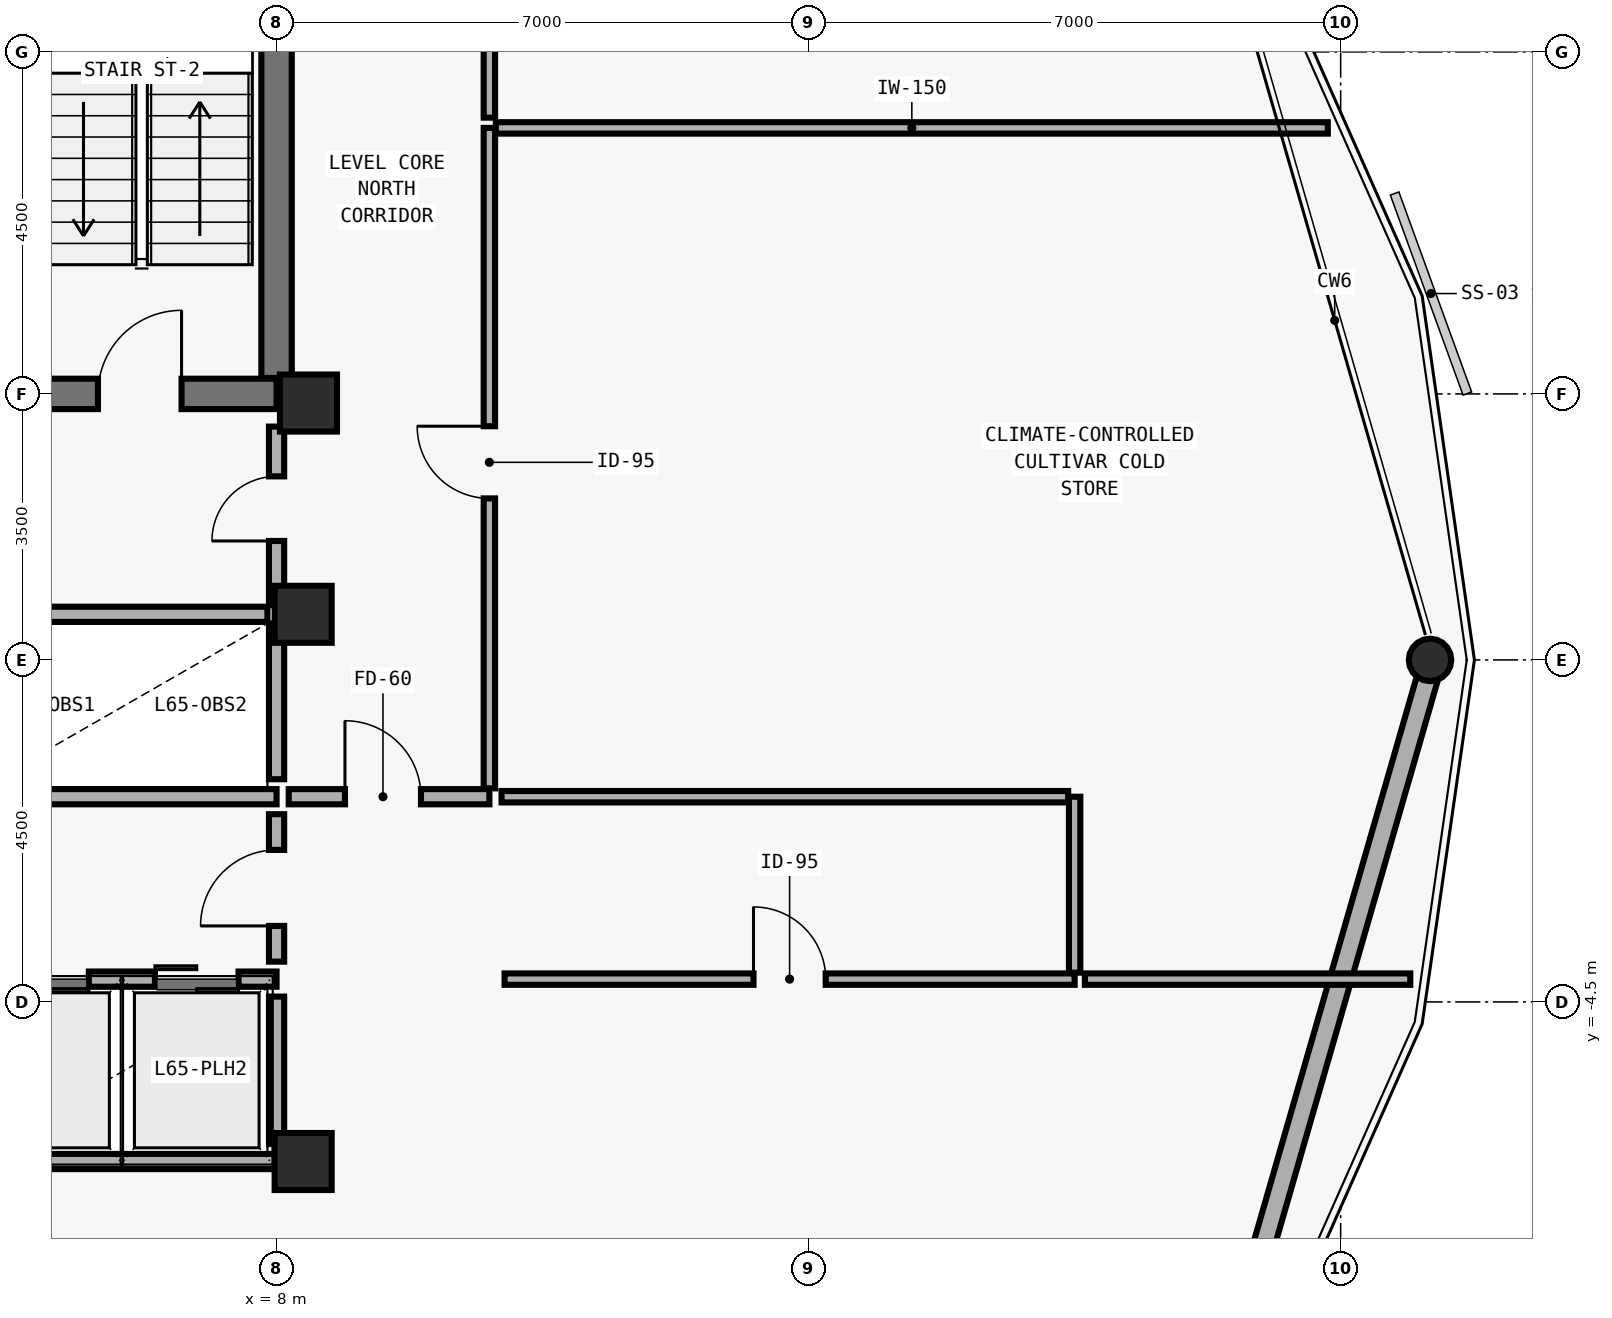
"""IFC4 building model, lengths in metres.
Left out: names, types, materials, properties, quantities, classifications, styles, units other than length and angle.
Written with IfcOpenShell. Run it as: python <this file> out.ifc"""

import sys

from ifc_helpers import new_model, si_unit, direction, frame, frame_2d, origin, origin_2d, place, context, subcontext, project, spatial, rectangle, hollow_circle, extrude, element, fill, save


model = new_model("IFC4")
c1 = context("Model", 3, precision=1e-05, world=origin(), true_north=direction((0.0, 1.0)))
c2 = subcontext(c1, "Body", "Model", "MODEL_VIEW")
j1 = project(units=[si_unit("LENGTHUNIT", "METRE"), si_unit("PLANEANGLEUNIT", "RADIAN")], contexts=[c1])
p1 = place(None, origin())
s1 = spatial("IfcSite", under=j1, at=p1, CompositionType="ELEMENT")
p2 = place(p1, origin())
s2 = spatial("IfcBuilding", under=s1, at=p2, CompositionType="ELEMENT")
p3 = place(p2, frame((0.0, 0.0, 256.2)))
s3 = spatial("IfcBuildingStorey", under=s2, at=p3, CompositionType="ELEMENT", Elevation=256.2)
p4 = place(p3, frame((-2.0, 3.5, 0.0), z_axis=(0.0, 0.0, 1.0), x_axis=(1.0, 0.0, 0.0)))
e1 = element("IfcWall", 1, at=p4, inside=s3, PredefinedType="SHEAR", context=c2, shape_type="SweptSolid", body=[
    extrude(rectangle(XDim=10.0, YDim=0.4, at=frame_2d((5.0, 0.0))), origin(), (0.0, 0.0, 1.0), 3.592),
])
p5 = place(p4, frame((1.65, 0.0, 0.0)))
e2 = element("IfcOpeningElement", 2, at=p5, cuts=e1, PredefinedType="OPENING", context=c2, shape_type="SweptSolid", body=[
    extrude(rectangle(XDim=1.1, YDim=2.15, at=frame_2d((0.55, 1.075))), frame((0.0, 0.21, 0.0), z_axis=(0.0, -1.0, 0.0), x_axis=(1.0, 0.0, 0.0)), (0.0, 0.0, 1.0), 0.42),
])
p6 = place(p4, frame((7.65, 0.0, 0.0)))
e3 = element("IfcOpeningElement", 3, at=p6, cuts=e1, PredefinedType="OPENING", context=c2, shape_type="SweptSolid", body=[
    extrude(rectangle(XDim=1.1, YDim=2.15, at=frame_2d((0.55, 1.075))), frame((0.0, 0.21, 0.0), z_axis=(0.0, -1.0, 0.0), x_axis=(1.0, 0.0, 0.0)), (0.0, 0.0, 1.0), 0.42),
])
p7 = place(p4, frame((3.72, 0.0, 0.0)))
e4 = element("IfcOpeningElement", 4, at=p7, cuts=e1, PredefinedType="OPENING", context=c2, shape_type="SweptSolid", body=[
    extrude(rectangle(XDim=1.1, YDim=2.2, at=frame_2d((0.55, 1.1))), frame((0.0, 0.21, 0.0), z_axis=(0.0, -1.0, 0.0), x_axis=(1.0, 0.0, 0.0)), (0.0, 0.0, 1.0), 0.42),
])
p8 = place(p4, frame((5.18, 0.0, 0.0)))
e5 = element("IfcOpeningElement", 5, at=p8, cuts=e1, PredefinedType="OPENING", context=c2, shape_type="SweptSolid", body=[
    extrude(rectangle(XDim=1.1, YDim=2.2, at=frame_2d((0.55, 1.1))), frame((0.0, 0.21, 0.0), z_axis=(0.0, -1.0, 0.0), x_axis=(1.0, 0.0, 0.0)), (0.0, 0.0, 1.0), 0.42),
])
p9 = place(p3, frame((8.0, 3.71, 0.0), z_axis=(0.0, 0.0, 1.0), x_axis=(0.0, 1.0, 0.0)))
e6 = element("IfcWall", 6, at=p9, inside=s3, PredefinedType="SHEAR", context=c2, shape_type="SweptSolid", body=[
    extrude(rectangle(XDim=8.58, YDim=0.4, at=frame_2d((4.29, 0.0))), origin(), (0.0, 0.0, 1.0), 3.592),
])
for number, where, z_axis, x_axis in (
    (7, (8.42, 3.38, 0.0), (0.0, 0.0, 1.0), (1.0, 0.0, 0.0)),
    (8, (8.35, 0.6, 0.0), (0.0, 0.0, 1.0), (1.0, 0.0, 0.0)),
    (9, (8.35, -6.6, 0.0), (0.0, 0.0, 1.0), (1.0, 0.0, 0.0)),
):
    element("IfcColumn", number, at=place(p3, frame(where, z_axis=z_axis, x_axis=x_axis)), inside=s3, PredefinedType="COLUMN", context=c2, shape_type="SweptSolid", body=[
        extrude(rectangle(XDim=0.75, YDim=0.75, at=origin_2d()), origin(), (0.0, 0.0, 1.0), 3.575),
    ])
p10 = place(p3, frame((23.21, 0.0, 0.0), z_axis=(-0.018981760075, 0.0, 0.999819830162), x_axis=(0.0, -1.0, 0.0)))
e10 = element("IfcColumn", 10, at=p10, inside=s3, PredefinedType="COLUMN", context=c2, shape_type="SweptSolid", body=[
    extrude(hollow_circle(Radius=0.28, WallThickness=0.02, at=origin_2d()), origin(), (0.0, 0.0, 1.0), 3.576),
])
p11 = place(p3, frame((23.145, -0.225, 0.0), z_axis=(0.0, 0.0, 1.0), x_axis=(-0.277093893844, -0.960842845628, 0.0)))
e11 = element("IfcWall", 11, at=p11, inside=s3, PredefinedType="SOLIDWALL", context=c2, shape_type="SweptSolid", body=[
    extrude(rectangle(XDim=8.83, YDim=0.28, at=frame_2d((4.415, 0.0))), origin(), (0.0, 0.0, 1.0), 2.97),
])
p12 = place(p3, frame((4.0, 0.6, 0.0), z_axis=(0.0, 0.0, 1.0), x_axis=(1.0, 0.0, 0.0)))
e12 = element("IfcWall", 12, at=p12, inside=s3, PredefinedType="SOLIDWALL", context=c2, shape_type="SweptSolid", body=[
    extrude(rectangle(XDim=3.88, YDim=0.2, at=frame_2d((1.94, 0.0))), origin(), (0.0, 0.0, 1.0), 3.072),
])
p13 = place(p3, frame((4.0, -1.8, 0.0), z_axis=(0.0, 0.0, 1.0), x_axis=(1.0, 0.0, 0.0)))
e13 = element("IfcWall", 13, at=p13, inside=s3, PredefinedType="SOLIDWALL", context=c2, shape_type="SweptSolid", body=[
    extrude(rectangle(XDim=4.0, YDim=0.2, at=frame_2d((2.0, 0.0))), origin(), (0.0, 0.0, 1.0), 3.36),
])
p14 = place(p3, frame((8.0, -1.57, 0.0), z_axis=(0.0, 0.0, 1.0), x_axis=(0.0, 1.0, 0.0)))
e14 = element("IfcWall", 14, at=p14, inside=s3, PredefinedType="SOLIDWALL", context=c2, shape_type="SweptSolid", body=[
    extrude(rectangle(XDim=2.05, YDim=0.2, at=frame_2d((1.025, 0.0))), origin(), (0.0, 0.0, 1.0), 3.072),
])
p15 = place(p3, frame((4.0, -4.2, 0.0), z_axis=(0.0, 0.0, 1.0), x_axis=(1.0, 0.0, 0.0)))
e15 = element("IfcWall", 15, at=p15, inside=s3, PredefinedType="SOLIDWALL", context=c2, shape_type="SweptSolid", body=[
    extrude(rectangle(XDim=4.0, YDim=0.2, at=frame_2d((2.0, 0.0))), origin(), (0.0, 0.0, 1.0), 3.36),
])
p16 = place(p15, frame((0.43, 0.0, 0.0)))
e16 = element("IfcOpeningElement", 16, at=p16, cuts=e15, PredefinedType="OPENING", context=c2, shape_type="SweptSolid", body=[
    extrude(rectangle(XDim=1.1, YDim=2.2, at=frame_2d((0.55, 1.1))), frame((0.0, 0.11, 0.0), z_axis=(0.0, -1.0, 0.0), x_axis=(1.0, 0.0, 0.0)), (0.0, 0.0, 1.0), 0.22),
])
p17 = place(p15, frame((2.4, 0.0, 0.0)))
e17 = element("IfcOpeningElement", 17, at=p17, cuts=e15, PredefinedType="OPENING", context=c2, shape_type="SweptSolid", body=[
    extrude(rectangle(XDim=1.1, YDim=2.2, at=frame_2d((0.55, 1.1))), frame((0.0, 0.11, 0.0), z_axis=(0.0, -1.0, 0.0), x_axis=(1.0, 0.0, 0.0)), (0.0, 0.0, 1.0), 0.22),
])
p18 = place(p3, frame((4.0, -6.6, 0.0), z_axis=(0.0, 0.0, 1.0), x_axis=(1.0, 0.0, 0.0)))
e18 = element("IfcWall", 18, at=p18, inside=s3, PredefinedType="SOLIDWALL", context=c2, shape_type="SweptSolid", body=[
    extrude(rectangle(XDim=4.0, YDim=0.2, at=frame_2d((2.0, 0.0))), origin(), (0.0, 0.0, 1.0), 3.072),
])
p19 = place(p3, frame((8.0, -6.37, 0.0), z_axis=(0.0, 0.0, 1.0), x_axis=(0.0, 1.0, 0.0)))
e19 = element("IfcWall", 19, at=p19, inside=s3, PredefinedType="SOLIDWALL", context=c2, shape_type="SweptSolid", body=[
    extrude(rectangle(XDim=1.94, YDim=0.2, at=frame_2d((0.97, 0.0))), origin(), (0.0, 0.0, 1.0), 3.072),
])
p20 = place(p3, frame((8.0, 0.72, 0.0), z_axis=(0.0, 0.0, 1.0), x_axis=(0.0, 1.0, 0.0)))
e20 = element("IfcWall", 20, at=p20, inside=s3, PredefinedType="MOVABLE", context=c2, shape_type="SweptSolid", body=[
    extrude(rectangle(XDim=2.35, YDim=0.2, at=frame_2d((1.175, 0.0))), origin(), (0.0, 0.0, 1.0), 2.692),
])
p21 = place(p20, frame((0.845, 0.0, 0.0)))
e21 = element("IfcOpeningElement", 21, at=p21, cuts=e20, PredefinedType="OPENING", context=c2, shape_type="SweptSolid", body=[
    extrude(rectangle(XDim=0.85, YDim=2.1, at=frame_2d((0.425, 1.05))), frame((0.0, 0.11, 0.0), z_axis=(0.0, -1.0, 0.0), x_axis=(1.0, 0.0, 0.0)), (0.0, 0.0, 1.0), 0.22),
])
p22 = place(p3, frame((8.0, -3.97, 0.0), z_axis=(0.0, 0.0, 1.0), x_axis=(0.0, 1.0, 0.0)))
e22 = element("IfcWall", 22, at=p22, inside=s3, PredefinedType="MOVABLE", context=c2, shape_type="SweptSolid", body=[
    extrude(rectangle(XDim=1.94, YDim=0.2, at=frame_2d((0.97, 0.0))), origin(), (0.0, 0.0, 1.0), 3.072),
])
p23 = place(p22, frame((0.47, 0.0, 0.0)))
e23 = element("IfcOpeningElement", 23, at=p23, cuts=e22, PredefinedType="OPENING", context=c2, shape_type="SweptSolid", body=[
    extrude(rectangle(XDim=1.0, YDim=2.1, at=frame_2d((0.5, 1.05))), frame((0.0, 0.11, 0.0), z_axis=(0.0, -1.0, 0.0), x_axis=(1.0, 0.0, 0.0)), (0.0, 0.0, 1.0), 0.22),
])
p24 = place(p3, frame((8.16, -1.8, 0.0), z_axis=(0.0, 0.0, 1.0), x_axis=(1.0, 0.0, 0.0)))
e24 = element("IfcWall", 24, at=p24, inside=s3, PredefinedType="MOVABLE", context=c2, shape_type="SweptSolid", body=[
    extrude(rectangle(XDim=2.64, YDim=0.2, at=frame_2d((1.32, 0.0))), origin(), (0.0, 0.0, 1.0), 3.36),
])
p25 = place(p24, frame((0.74, 0.0, 0.0)))
e25 = element("IfcOpeningElement", 25, at=p25, cuts=e24, PredefinedType="OPENING", context=c2, shape_type="SweptSolid", body=[
    extrude(rectangle(XDim=1.0, YDim=2.1, at=frame_2d((0.5, 1.05))), frame((0.0, 0.11, 0.0), z_axis=(0.0, -1.0, 0.0), x_axis=(1.0, 0.0, 0.0)), (0.0, 0.0, 1.0), 0.22),
])
p26 = place(p3, frame((11.0, -4.2, 0.0), z_axis=(0.0, 0.0, 1.0), x_axis=(1.0, 0.0, 0.0)))
e26 = element("IfcWall", 26, at=p26, inside=s3, PredefinedType="PARTITIONING", context=c2, shape_type="SweptSolid", body=[
    extrude(rectangle(XDim=7.5, YDim=0.15, at=frame_2d((3.75, 0.0))), origin(), (0.0, 0.0, 1.0), 3.36),
])
p27 = place(p26, frame((3.275, 0.0, 0.0)))
e27 = element("IfcOpeningElement", 27, at=p27, cuts=e26, PredefinedType="OPENING", context=c2, shape_type="SweptSolid", body=[
    extrude(rectangle(XDim=0.95, YDim=2.1, at=frame_2d((0.475, 1.05))), frame((0.0, 0.085, 0.0), z_axis=(0.0, -1.0, 0.0), x_axis=(1.0, 0.0, 0.0)), (0.0, 0.0, 1.0), 0.17),
])
p28 = place(p3, frame((10.8, -1.69, 0.0), z_axis=(0.0, 0.0, 1.0), x_axis=(0.0, 1.0, 0.0)))
e28 = element("IfcWall", 28, at=p28, inside=s3, PredefinedType="PARTITIONING", context=c2, shape_type="SweptSolid", body=[
    extrude(rectangle(XDim=8.69, YDim=0.15, at=frame_2d((4.345, 0.0))), origin(), (0.0, 0.0, 1.0), 3.36),
])
p29 = place(p28, frame((3.815, 0.0, 0.0)))
e29 = element("IfcOpeningElement", 29, at=p29, cuts=e28, PredefinedType="OPENING", context=c2, shape_type="SweptSolid", body=[
    extrude(rectangle(XDim=0.95, YDim=2.1, at=frame_2d((0.475, 1.05))), frame((0.0, 0.085, 0.0), z_axis=(0.0, -1.0, 0.0), x_axis=(1.0, 0.0, 0.0)), (0.0, 0.0, 1.0), 0.17),
])
p30 = place(p3, frame((10.8, 7.135, 0.0), z_axis=(0.0, 0.0, 1.0), x_axis=(0.0, 1.0, 0.0)))
e30 = element("IfcWall", 30, at=p30, inside=s3, PredefinedType="PARTITIONING", context=c2, shape_type="SweptSolid", body=[
    extrude(rectangle(XDim=5.365, YDim=0.15, at=frame_2d((2.683, 0.0))), origin(), (0.0, 0.0, 1.0), 3.36),
])
p31 = place(p30, frame((2.14, 0.0, 0.0)))
e31 = element("IfcOpeningElement", 31, at=p31, cuts=e30, PredefinedType="OPENING", context=c2, shape_type="SweptSolid", body=[
    extrude(rectangle(XDim=0.95, YDim=2.1, at=frame_2d((0.475, 1.05))), frame((0.0, 0.085, 0.0), z_axis=(0.0, -1.0, 0.0), x_axis=(1.0, 0.0, 0.0)), (0.0, 0.0, 1.0), 0.17),
])
p32 = place(p3, frame((18.635, -4.2, 0.0), z_axis=(0.0, 0.0, 1.0), x_axis=(1.0, 0.0, 0.0)))
e32 = element("IfcWall", 32, at=p32, inside=s3, PredefinedType="PARTITIONING", context=c2, shape_type="SweptSolid", body=[
    extrude(rectangle(XDim=4.281, YDim=0.15, at=frame_2d((2.141, 0.0))), origin(), (0.0, 0.0, 1.0), 3.36),
])
p33 = place(p3, frame((18.5, -4.115, 0.0), z_axis=(0.0, 0.0, 1.0), x_axis=(0.0, 1.0, 0.0)))
e33 = element("IfcWall", 33, at=p33, inside=s3, PredefinedType="PARTITIONING", context=c2, shape_type="SweptSolid", body=[
    extrude(rectangle(XDim=2.315, YDim=0.15, at=frame_2d((1.157, 0.0))), origin(), (0.0, 0.0, 1.0), 3.36),
])
p34 = place(p3, frame((18.415, -1.8, 0.0), z_axis=(0.0, 0.0, 1.0), x_axis=(-1.0, 0.0, 0.0)))
e34 = element("IfcWall", 34, at=p34, inside=s3, PredefinedType="PARTITIONING", context=c2, shape_type="SweptSolid", body=[
    extrude(rectangle(XDim=7.455, YDim=0.15, at=frame_2d((3.728, 0.0))), origin(), (0.0, 0.0, 1.0), 3.36),
])
p35 = place(p3, frame((10.885, 7.0, 0.0), z_axis=(0.0, 0.0, 1.0), x_axis=(1.0, 0.0, 0.0)))
e35 = element("IfcWall", 35, at=p35, inside=s3, PredefinedType="PARTITIONING", context=c2, shape_type="SweptSolid", body=[
    extrude(rectangle(XDim=10.946, YDim=0.15, at=frame_2d((5.473, 0.0))), origin(), (0.0, 0.0, 1.0), 3.36),
])
p36 = place(p6, origin())
e36 = element("IfcDoor", 36, at=p36, inside=s3, OperationType="SINGLE_SWING_RIGHT", PredefinedType="DOOR", context=c2, shape_type="SweptSolid", body=[
    extrude(rectangle(XDim=1.1, YDim=2.15, at=frame_2d((0.55, 1.075))), frame((0.0, 0.025, 0.0), z_axis=(0.0, -1.0, 0.0), x_axis=(1.0, 0.0, 0.0)), (0.0, 0.0, 1.0), 0.05),
])
fill(e3, e36)
p37 = place(p21, origin())
e37 = element("IfcDoor", 37, at=p37, inside=s3, OperationType="SINGLE_SWING_LEFT", PredefinedType="DOOR", context=c2, shape_type="SweptSolid", body=[
    extrude(rectangle(XDim=0.85, YDim=2.1, at=frame_2d((0.425, 1.05))), frame((0.0, 0.025, 0.0), z_axis=(0.0, -1.0, 0.0), x_axis=(1.0, 0.0, 0.0)), (0.0, 0.0, 1.0), 0.05),
])
fill(e21, e37)
p38 = place(p23, origin())
e38 = element("IfcDoor", 38, at=p38, inside=s3, OperationType="SINGLE_SWING_LEFT", PredefinedType="DOOR", context=c2, shape_type="SweptSolid", body=[
    extrude(rectangle(XDim=1.0, YDim=2.1, at=frame_2d((0.5, 1.05))), frame((0.0, 0.025, 0.0), z_axis=(0.0, -1.0, 0.0), x_axis=(1.0, 0.0, 0.0)), (0.0, 0.0, 1.0), 0.05),
])
fill(e23, e38)
p39 = place(p25, origin())
e39 = element("IfcDoor", 39, at=p39, inside=s3, OperationType="SINGLE_SWING_LEFT", PredefinedType="DOOR", context=c2, shape_type="SweptSolid", body=[
    extrude(rectangle(XDim=1.0, YDim=2.1, at=frame_2d((0.5, 1.05))), frame((0.0, 0.025, 0.0), z_axis=(0.0, -1.0, 0.0), x_axis=(1.0, 0.0, 0.0)), (0.0, 0.0, 1.0), 0.05),
])
fill(e25, e39)
p40 = place(p27, origin())
e40 = element("IfcDoor", 40, at=p40, inside=s3, OperationType="SINGLE_SWING_LEFT", PredefinedType="DOOR", context=c2, shape_type="SweptSolid", body=[
    extrude(rectangle(XDim=0.95, YDim=2.1, at=frame_2d((0.475, 1.05))), frame((0.0, 0.025, 0.0), z_axis=(0.0, -1.0, 0.0), x_axis=(1.0, 0.0, 0.0)), (0.0, 0.0, 1.0), 0.05),
])
fill(e27, e40)
p41 = place(p29, origin())
e41 = element("IfcDoor", 41, at=p41, inside=s3, OperationType="SINGLE_SWING_RIGHT", PredefinedType="DOOR", context=c2, shape_type="SweptSolid", body=[
    extrude(rectangle(XDim=0.95, YDim=2.1, at=frame_2d((0.475, 1.05))), frame((0.0, 0.025, 0.0), z_axis=(0.0, -1.0, 0.0), x_axis=(1.0, 0.0, 0.0)), (0.0, 0.0, 1.0), 0.05),
])
fill(e29, e41)
p42 = place(p16, origin())
e42 = element("IfcDoor", 42, at=p42, inside=s3, OperationType="DOUBLE_DOOR_SLIDING", PredefinedType="DOOR", context=c2, shape_type="SweptSolid", body=[
    extrude(rectangle(XDim=1.1, YDim=2.2, at=frame_2d((0.55, 1.1))), frame((0.0, 0.025, 0.0), z_axis=(0.0, -1.0, 0.0), x_axis=(1.0, 0.0, 0.0)), (0.0, 0.0, 1.0), 0.05),
])
fill(e16, e42)
p43 = place(p17, origin())
e43 = element("IfcDoor", 43, at=p43, inside=s3, OperationType="DOUBLE_DOOR_SLIDING", PredefinedType="DOOR", context=c2, shape_type="SweptSolid", body=[
    extrude(rectangle(XDim=1.1, YDim=2.2, at=frame_2d((0.55, 1.1))), frame((0.0, 0.025, 0.0), z_axis=(0.0, -1.0, 0.0), x_axis=(1.0, 0.0, 0.0)), (0.0, 0.0, 1.0), 0.05),
])
fill(e17, e43)
save(model, sys.argv[1])
